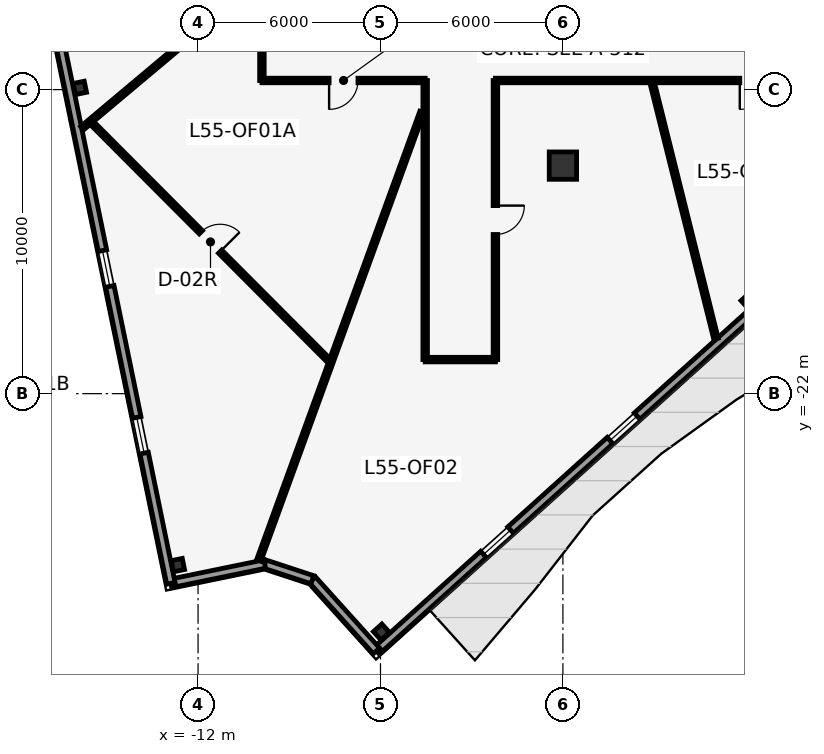
"""IFC4 building model, lengths in metres.
Left out: names, types, materials, properties, quantities, classifications, styles, units other than length and angle.
Written with IfcOpenShell. Run it as: python <this file> out.ifc"""

import sys

from ifc_helpers import new_model, si_unit, direction, frame, frame_2d, origin, origin_2d, place, context, subcontext, project, spatial, rectangle, i_section, extrude, element, fill, save


model = new_model("IFC4")
c1 = context("Model", 3, precision=1e-05, world=origin(), true_north=direction((0.0, 1.0)))
c2 = subcontext(c1, "Body", "Model", "MODEL_VIEW")
j1 = project(units=[si_unit("LENGTHUNIT", "METRE"), si_unit("PLANEANGLEUNIT", "RADIAN")], contexts=[c1])
p1 = place(None, origin())
s1 = spatial("IfcSite", under=j1, at=p1, CompositionType="ELEMENT")
p2 = place(p1, origin())
s2 = spatial("IfcBuilding", under=s1, at=p2, CompositionType="ELEMENT")
p3 = place(p2, frame((0.0, 0.0, 236.3)))
s3 = spatial("IfcBuildingStorey", under=s2, at=p3, CompositionType="ELEMENT", Elevation=236.3)
p4 = place(p3, frame((0.0, -14.5, 0.0), z_axis=(0.0, 0.0, 1.0), x_axis=(1.0, 0.0, 0.0)))
e1 = element("IfcColumn", 1, at=p4, inside=s3, PredefinedType="COLUMN", context=c2, shape_type="SweptSolid", body=[
    extrude(rectangle(XDim=0.9, YDim=0.9, at=origin_2d()), origin(), (0.0, 0.0, 1.0), 4.1),
])
for number, where, z_axis, x_axis in (
    (2, (-15.889, -11.944, 0.0), (0.0, 0.0, 1.0), (-0.201, 0.98, 0.0)),
    (3, (-12.664, -27.639, 0.0), (0.0, 0.0, 1.0), (-0.201, 0.98, 0.0)),
    (4, (-5.968, -29.84, 0.0), (0.0, 0.0, 1.0), (0.743, 0.669, 0.0)),
    (5, (6.122, -18.955, 0.0), (0.0, 0.0, 1.0), (0.743, 0.669, 0.0)),
):
    element("IfcColumn", number, at=place(p3, frame(where, z_axis=z_axis, x_axis=x_axis)), inside=s3, PredefinedType="COLUMN", context=c2, shape_type="SweptSolid", body=[
        extrude(i_section(OverallWidth=0.373, OverallDepth=0.373, WebThickness=0.016, FlangeThickness=0.026, at=origin_2d()), origin(), (0.0, 0.0, 1.0), 4.1),
    ])
p5 = place(p3, frame((30.935, 2.916, 0.0), z_axis=(0.0, 0.0, 1.0), x_axis=(-0.743143233829, -0.66913237406, 0.0)))
e6 = element("IfcWall", 6, at=p5, inside=s3, PredefinedType="STANDARD", context=c2, shape_type="SweptSolid", body=[
    extrude(rectangle(XDim=49.88, YDim=0.28, at=frame_2d((24.94, 0.0))), origin(), (0.0, 0.0, 1.0), 3.85),
])
p6 = place(p5, frame((24.44, 0.0, 0.0)))
e7 = element("IfcOpeningElement", 7, at=p6, cuts=e6, PredefinedType="OPENING", context=c2, shape_type="SweptSolid", body=[
    extrude(rectangle(XDim=1.0, YDim=2.15, at=frame_2d((0.5, 1.075))), frame((0.0, 0.15, 0.0), z_axis=(0.0, -1.0, 0.0), x_axis=(1.0, 0.0, 0.0)), (0.0, 0.0, 1.0), 0.3),
])
p7 = place(p5, frame((4.74, 0.0, 0.85)))
e8 = element("IfcOpeningElement", 8, at=p7, cuts=e6, PredefinedType="OPENING", context=c2, shape_type="SweptSolid", body=[
    extrude(rectangle(XDim=1.2, YDim=2.2, at=frame_2d((0.6, 1.1))), frame((0.0, 0.15, 0.0), z_axis=(0.0, -1.0, 0.0), x_axis=(1.0, 0.0, 0.0)), (0.0, 0.0, 1.0), 0.3),
])
p8 = place(p5, frame((10.34, 0.0, 0.85)))
e9 = element("IfcOpeningElement", 9, at=p8, cuts=e6, PredefinedType="OPENING", context=c2, shape_type="SweptSolid", body=[
    extrude(rectangle(XDim=1.2, YDim=2.2, at=frame_2d((0.6, 1.1))), frame((0.0, 0.15, 0.0), z_axis=(0.0, -1.0, 0.0), x_axis=(1.0, 0.0, 0.0)), (0.0, 0.0, 1.0), 0.3),
])
p9 = place(p5, frame((27.14, 0.0, 0.85)))
e10 = element("IfcOpeningElement", 10, at=p9, cuts=e6, PredefinedType="OPENING", context=c2, shape_type="SweptSolid", body=[
    extrude(rectangle(XDim=1.2, YDim=2.2, at=frame_2d((0.6, 1.1))), frame((0.0, 0.15, 0.0), z_axis=(0.0, -1.0, 0.0), x_axis=(1.0, 0.0, 0.0)), (0.0, 0.0, 1.0), 0.3),
])
p10 = place(p5, frame((38.34, 0.0, 0.85)))
e11 = element("IfcOpeningElement", 11, at=p10, cuts=e6, PredefinedType="OPENING", context=c2, shape_type="SweptSolid", body=[
    extrude(rectangle(XDim=1.2, YDim=2.2, at=frame_2d((0.6, 1.1))), frame((0.0, 0.15, 0.0), z_axis=(0.0, -1.0, 0.0), x_axis=(1.0, 0.0, 0.0)), (0.0, 0.0, 1.0), 0.3),
])
p11 = place(p5, frame((43.94, 0.0, 0.85)))
e12 = element("IfcOpeningElement", 12, at=p11, cuts=e6, PredefinedType="OPENING", context=c2, shape_type="SweptSolid", body=[
    extrude(rectangle(XDim=1.2, YDim=2.2, at=frame_2d((0.6, 1.1))), frame((0.0, 0.15, 0.0), z_axis=(0.0, -1.0, 0.0), x_axis=(1.0, 0.0, 0.0)), (0.0, 0.0, 1.0), 0.3),
])
p12 = place(p3, frame((-6.133, -30.46, 0.0), z_axis=(0.0, 0.0, 1.0), x_axis=(-0.669131702868, 0.743143838175, 0.0)))
e13 = element("IfcWall", 13, at=p12, inside=s3, PredefinedType="STANDARD", context=c2, shape_type="SweptSolid", body=[
    extrude(rectangle(XDim=3.15, YDim=0.28, at=frame_2d((1.575, 0.0))), origin(), (0.0, 0.0, 1.0), 3.85),
])
p13 = place(p3, frame((-8.241, -28.119, 0.0), z_axis=(0.0, 0.0, 1.0), x_axis=(-0.950036767419, 0.312138015231, 0.0)))
e14 = element("IfcWall", 14, at=p13, inside=s3, PredefinedType="STANDARD", context=c2, shape_type="SweptSolid", body=[
    extrude(rectangle(XDim=1.649, YDim=0.28, at=frame_2d((0.824, 0.0))), origin(), (0.0, 0.0, 1.0), 3.85),
])
p14 = place(p3, frame((-9.808, -27.605, 0.0), z_axis=(0.0, 0.0, 1.0), x_axis=(-0.979505186658, -0.201418939799, 0.0)))
e15 = element("IfcWall", 15, at=p14, inside=s3, PredefinedType="STANDARD", context=c2, shape_type="SweptSolid", body=[
    extrude(rectangle(XDim=3.15, YDim=0.28, at=frame_2d((1.575, 0.0))), origin(), (0.0, 0.0, 1.0), 3.85),
])
p15 = place(p3, frame((-12.893, -28.239, 0.0), z_axis=(0.0, 0.0, 1.0), x_axis=(-0.201426823496, 0.979503565474, 0.0)))
e16 = element("IfcWall", 16, at=p15, inside=s3, PredefinedType="STANDARD", context=c2, shape_type="SweptSolid", body=[
    extrude(rectangle(XDim=49.145, YDim=0.28, at=frame_2d((24.573, 0.0))), origin(), (0.0, 0.0, 1.0), 3.85),
])
p16 = place(p15, frame((4.373, 0.0, 0.85)))
e17 = element("IfcOpeningElement", 17, at=p16, cuts=e16, PredefinedType="OPENING", context=c2, shape_type="SweptSolid", body=[
    extrude(rectangle(XDim=1.2, YDim=2.2, at=frame_2d((0.6, 1.1))), frame((0.0, 0.15, 0.0), z_axis=(0.0, -1.0, 0.0), x_axis=(1.0, 0.0, 0.0)), (0.0, 0.0, 1.0), 0.3),
])
p17 = place(p15, frame((9.973, 0.0, 0.85)))
e18 = element("IfcOpeningElement", 18, at=p17, cuts=e16, PredefinedType="OPENING", context=c2, shape_type="SweptSolid", body=[
    extrude(rectangle(XDim=1.2, YDim=2.2, at=frame_2d((0.6, 1.1))), frame((0.0, 0.15, 0.0), z_axis=(0.0, -1.0, 0.0), x_axis=(1.0, 0.0, 0.0)), (0.0, 0.0, 1.0), 0.3),
])
p18 = place(p15, frame((21.173, 0.0, 0.85)))
e19 = element("IfcOpeningElement", 19, at=p18, cuts=e16, PredefinedType="OPENING", context=c2, shape_type="SweptSolid", body=[
    extrude(rectangle(XDim=1.2, YDim=2.2, at=frame_2d((0.6, 1.1))), frame((0.0, 0.15, 0.0), z_axis=(0.0, -1.0, 0.0), x_axis=(1.0, 0.0, 0.0)), (0.0, 0.0, 1.0), 0.3),
])
p19 = place(p15, frame((26.773, 0.0, 0.85)))
e20 = element("IfcOpeningElement", 20, at=p19, cuts=e16, PredefinedType="OPENING", context=c2, shape_type="SweptSolid", body=[
    extrude(rectangle(XDim=1.2, YDim=2.2, at=frame_2d((0.6, 1.1))), frame((0.0, 0.15, 0.0), z_axis=(0.0, -1.0, 0.0), x_axis=(1.0, 0.0, 0.0)), (0.0, 0.0, 1.0), 0.3),
])
p20 = place(p15, frame((37.973, 0.0, 0.85)))
e21 = element("IfcOpeningElement", 21, at=p20, cuts=e16, PredefinedType="OPENING", context=c2, shape_type="SweptSolid", body=[
    extrude(rectangle(XDim=1.2, YDim=2.2, at=frame_2d((0.6, 1.1))), frame((0.0, 0.15, 0.0), z_axis=(0.0, -1.0, 0.0), x_axis=(1.0, 0.0, 0.0)), (0.0, 0.0, 1.0), 0.3),
])
p21 = place(p15, frame((43.573, 0.0, 0.85)))
e22 = element("IfcOpeningElement", 22, at=p21, cuts=e16, PredefinedType="OPENING", context=c2, shape_type="SweptSolid", body=[
    extrude(rectangle(XDim=1.2, YDim=2.2, at=frame_2d((0.6, 1.1))), frame((0.0, 0.15, 0.0), z_axis=(0.0, -1.0, 0.0), x_axis=(1.0, 0.0, 0.0)), (0.0, 0.0, 1.0), 0.3),
])
p22 = place(p3, frame((-4.53, -11.7, 0.0), z_axis=(0.0, 0.0, 1.0), x_axis=(-1.0, 0.0, 0.0)))
e23 = element("IfcWall", 23, at=p22, inside=s3, PredefinedType="PARTITIONING", context=c2, shape_type="SweptSolid", body=[
    extrude(rectangle(XDim=5.37, YDim=0.15, at=frame_2d((2.685, 0.0))), origin(), (0.0, 0.0, 1.0), 3.85),
])
p23 = place(p22, frame((2.21, 0.0, 0.0)))
e24 = element("IfcOpeningElement", 24, at=p23, cuts=e23, PredefinedType="OPENING", context=c2, shape_type="SweptSolid", body=[
    extrude(rectangle(XDim=0.95, YDim=2.15, at=frame_2d((0.475, 1.075))), frame((0.0, 0.085, 0.0), z_axis=(0.0, -1.0, 0.0), x_axis=(1.0, 0.0, 0.0)), (0.0, 0.0, 1.0), 0.17),
])
p24 = place(p3, frame((-9.9, -11.7, 0.0), z_axis=(0.0, 0.0, 1.0), x_axis=(0.0, 1.0, 0.0)))
e25 = element("IfcWall", 25, at=p24, inside=s3, PredefinedType="PARTITIONING", context=c2, shape_type="SweptSolid", body=[
    extrude(rectangle(XDim=23.55, YDim=0.15, at=frame_2d((11.775, 0.0))), origin(), (0.0, 0.0, 1.0), 3.85),
])
p25 = place(p24, frame((6.145, 0.0, 0.0)))
e26 = element("IfcOpeningElement", 26, at=p25, cuts=e25, PredefinedType="OPENING", context=c2, shape_type="SweptSolid", body=[
    extrude(rectangle(XDim=0.95, YDim=2.15, at=frame_2d((0.475, 1.075))), frame((0.0, 0.085, 0.0), z_axis=(0.0, -1.0, 0.0), x_axis=(1.0, 0.0, 0.0)), (0.0, 0.0, 1.0), 0.17),
])
p26 = place(p24, frame((18.645, 0.0, 0.0)))
e27 = element("IfcOpeningElement", 27, at=p26, cuts=e25, PredefinedType="OPENING", context=c2, shape_type="SweptSolid", body=[
    extrude(rectangle(XDim=0.95, YDim=2.15, at=frame_2d((0.475, 1.075))), frame((0.0, 0.085, 0.0), z_axis=(0.0, -1.0, 0.0), x_axis=(1.0, 0.0, 0.0)), (0.0, 0.0, 1.0), 0.17),
])
p27 = place(p24, frame((11.967, 0.0, 0.0)))
e28 = element("IfcOpeningElement", 28, at=p27, cuts=e25, PredefinedType="OPENING", context=c2, shape_type="SweptSolid", body=[
    extrude(rectangle(XDim=0.95, YDim=2.15, at=frame_2d((0.475, 1.075))), frame((0.0, 0.085, 0.0), z_axis=(0.0, -1.0, 0.0), x_axis=(1.0, 0.0, 0.0)), (0.0, 0.0, 1.0), 0.17),
])
p28 = place(p3, frame((9.9, -11.7, 0.0), z_axis=(0.0, 0.0, 1.0), x_axis=(-1.0, 0.0, 0.0)))
e29 = element("IfcWall", 29, at=p28, inside=s3, PredefinedType="PARTITIONING", context=c2, shape_type="SweptSolid", body=[
    extrude(rectangle(XDim=12.12, YDim=0.15, at=frame_2d((6.06, 0.0))), origin(), (0.0, 0.0, 1.0), 3.85),
])
p29 = place(p28, frame((3.133, 0.0, 0.0)))
e30 = element("IfcOpeningElement", 30, at=p29, cuts=e29, PredefinedType="OPENING", context=c2, shape_type="SweptSolid", body=[
    extrude(rectangle(XDim=0.95, YDim=2.15, at=frame_2d((0.475, 1.075))), frame((0.0, 0.085, 0.0), z_axis=(0.0, -1.0, 0.0), x_axis=(1.0, 0.0, 0.0)), (0.0, 0.0, 1.0), 0.17),
])
p30 = place(p3, frame((-2.22, -11.7, 0.0), z_axis=(0.0, 0.0, 1.0), x_axis=(0.0, -1.0, 0.0)))
e31 = element("IfcWall", 31, at=p30, inside=s3, PredefinedType="PARTITIONING", context=c2, shape_type="SweptSolid", body=[
    extrude(rectangle(XDim=9.18, YDim=0.15, at=frame_2d((4.59, 0.0))), origin(), (0.0, 0.0, 1.0), 3.85),
])
p31 = place(p30, frame((4.115, 0.0, 0.0)))
e32 = element("IfcOpeningElement", 32, at=p31, cuts=e31, PredefinedType="OPENING", context=c2, shape_type="SweptSolid", body=[
    extrude(rectangle(XDim=0.95, YDim=2.15, at=frame_2d((0.475, 1.075))), frame((0.0, 0.085, 0.0), z_axis=(0.0, -1.0, 0.0), x_axis=(1.0, 0.0, 0.0)), (0.0, 0.0, 1.0), 0.17),
])
p32 = place(p3, frame((-2.22, -20.88, 0.0), z_axis=(0.0, 0.0, 1.0), x_axis=(-1.0, 0.0, 0.0)))
e33 = element("IfcWall", 33, at=p32, inside=s3, PredefinedType="PARTITIONING", context=c2, shape_type="SweptSolid", body=[
    extrude(rectangle(XDim=2.31, YDim=0.15, at=frame_2d((1.155, 0.0))), origin(), (0.0, 0.0, 1.0), 3.85),
])
p33 = place(p3, frame((-4.53, -20.88, 0.0), z_axis=(0.0, 0.0, 1.0), x_axis=(0.0, 1.0, 0.0)))
e34 = element("IfcWall", 34, at=p33, inside=s3, PredefinedType="PARTITIONING", context=c2, shape_type="SweptSolid", body=[
    extrude(rectangle(XDim=9.18, YDim=0.15, at=frame_2d((4.59, 0.0))), origin(), (0.0, 0.0, 1.0), 3.85),
])
p34 = place(p3, frame((-10.005, -8.395, 0.0), z_axis=(0.0, 0.0, 1.0), x_axis=(-0.766058052835, -0.64277138991, 0.0)))
e35 = element("IfcWall", 35, at=p34, inside=s3, PredefinedType="PARTITIONING", context=c2, shape_type="SweptSolid", body=[
    extrude(rectangle(XDim=7.583, YDim=0.15, at=frame_2d((3.791, 0.0))), origin(), (0.0, 0.0, 1.0), 3.85),
])
p35 = place(p3, frame((-4.635, -12.735, 0.0), z_axis=(0.0, 0.0, 1.0), x_axis=(-0.342021497246, -0.939692127998, 0.0)))
e36 = element("IfcWall", 36, at=p35, inside=s3, PredefinedType="PARTITIONING", context=c2, shape_type="SweptSolid", body=[
    extrude(rectangle(XDim=15.699, YDim=0.15, at=frame_2d((7.85, 0.0))), origin(), (0.0, 0.0, 1.0), 3.85),
])
p36 = place(p3, frame((2.943, -11.805, 0.0), z_axis=(0.0, 0.0, 1.0), x_axis=(0.241924425986, -0.970295095376, 0.0)))
e37 = element("IfcWall", 37, at=p36, inside=s3, PredefinedType="PARTITIONING", context=c2, shape_type="SweptSolid", body=[
    extrude(rectangle(XDim=8.647, YDim=0.15, at=frame_2d((4.324, 0.0))), origin(), (0.0, 0.0, 1.0), 3.85),
])
p37 = place(p3, frame((-15.528, -13.062, 0.0), z_axis=(0.0, 0.0, 1.0), x_axis=(0.706087904812, -0.708124191564, 0.0)))
e38 = element("IfcWall", 38, at=p37, inside=s3, PredefinedType="PARTITIONING", context=c2, shape_type="SweptSolid", body=[
    extrude(rectangle(XDim=11.15, YDim=0.15, at=frame_2d((5.575, 0.0))), origin(), (0.0, 0.0, 1.0), 3.85),
])
p38 = place(p37, frame((5.125, 0.0, 0.0)))
e39 = element("IfcOpeningElement", 39, at=p38, cuts=e38, PredefinedType="OPENING", context=c2, shape_type="SweptSolid", body=[
    extrude(rectangle(XDim=0.9, YDim=2.1, at=frame_2d((0.45, 1.05))), frame((0.0, 0.085, 0.0), z_axis=(0.0, -1.0, 0.0), x_axis=(1.0, 0.0, 0.0)), (0.0, 0.0, 1.0), 0.17),
])
p39 = place(p10, origin())
e40 = element("IfcWindow", 40, at=p39, inside=s3, PartitioningType="SINGLE_PANEL", PredefinedType="WINDOW", context=c2, shape_type="SweptSolid", body=[
    extrude(rectangle(XDim=1.2, YDim=2.2, at=frame_2d((0.6, 1.1))), frame((0.0, 0.03, 0.0), z_axis=(0.0, -1.0, 0.0), x_axis=(1.0, 0.0, 0.0)), (0.0, 0.0, 1.0), 0.06),
])
fill(e11, e40)
p40 = place(p11, origin())
e41 = element("IfcWindow", 41, at=p40, inside=s3, PartitioningType="SINGLE_PANEL", PredefinedType="WINDOW", context=c2, shape_type="SweptSolid", body=[
    extrude(rectangle(XDim=1.2, YDim=2.2, at=frame_2d((0.6, 1.1))), frame((0.0, 0.03, 0.0), z_axis=(0.0, -1.0, 0.0), x_axis=(1.0, 0.0, 0.0)), (0.0, 0.0, 1.0), 0.06),
])
fill(e12, e41)
p41 = place(p16, origin())
e42 = element("IfcWindow", 42, at=p41, inside=s3, PartitioningType="SINGLE_PANEL", PredefinedType="WINDOW", context=c2, shape_type="SweptSolid", body=[
    extrude(rectangle(XDim=1.2, YDim=2.2, at=frame_2d((0.6, 1.1))), frame((0.0, 0.03, 0.0), z_axis=(0.0, -1.0, 0.0), x_axis=(1.0, 0.0, 0.0)), (0.0, 0.0, 1.0), 0.06),
])
fill(e17, e42)
p42 = place(p17, origin())
e43 = element("IfcWindow", 43, at=p42, inside=s3, PartitioningType="SINGLE_PANEL", PredefinedType="WINDOW", context=c2, shape_type="SweptSolid", body=[
    extrude(rectangle(XDim=1.2, YDim=2.2, at=frame_2d((0.6, 1.1))), frame((0.0, 0.03, 0.0), z_axis=(0.0, -1.0, 0.0), x_axis=(1.0, 0.0, 0.0)), (0.0, 0.0, 1.0), 0.06),
])
fill(e18, e43)
p43 = place(p38, origin())
e44 = element("IfcDoor", 44, at=p43, inside=s3, OperationType="SINGLE_SWING_RIGHT", PredefinedType="DOOR", context=c2, shape_type="SweptSolid", body=[
    extrude(rectangle(XDim=0.9, YDim=2.1, at=frame_2d((0.45, 1.05))), frame((0.0, 0.025, 0.0), z_axis=(0.0, -1.0, 0.0), x_axis=(1.0, 0.0, 0.0)), (0.0, 0.0, 1.0), 0.05),
])
fill(e39, e44)
p44 = place(p23, origin())
e45 = element("IfcDoor", 45, at=p44, inside=s3, OperationType="SINGLE_SWING_RIGHT", PredefinedType="DOOR", context=c2, shape_type="SweptSolid", body=[
    extrude(rectangle(XDim=0.95, YDim=2.15, at=frame_2d((0.475, 1.075))), frame((0.0, 0.025, 0.0), z_axis=(0.0, -1.0, 0.0), x_axis=(1.0, 0.0, 0.0)), (0.0, 0.0, 1.0), 0.05),
])
fill(e24, e45)
p45 = place(p31, origin())
e46 = element("IfcDoor", 46, at=p45, inside=s3, OperationType="SINGLE_SWING_LEFT", PredefinedType="DOOR", context=c2, shape_type="SweptSolid", body=[
    extrude(rectangle(XDim=0.95, YDim=2.15, at=frame_2d((0.475, 1.075))), frame((0.0, 0.025, 0.0), z_axis=(0.0, -1.0, 0.0), x_axis=(1.0, 0.0, 0.0)), (0.0, 0.0, 1.0), 0.05),
])
fill(e32, e46)
p46 = place(p29, origin())
e47 = element("IfcDoor", 47, at=p46, inside=s3, OperationType="SINGLE_SWING_RIGHT", PredefinedType="DOOR", context=c2, shape_type="SweptSolid", body=[
    extrude(rectangle(XDim=0.95, YDim=2.15, at=frame_2d((0.475, 1.075))), frame((0.0, 0.025, 0.0), z_axis=(0.0, -1.0, 0.0), x_axis=(1.0, 0.0, 0.0)), (0.0, 0.0, 1.0), 0.05),
])
fill(e30, e47)
save(model, sys.argv[1])
